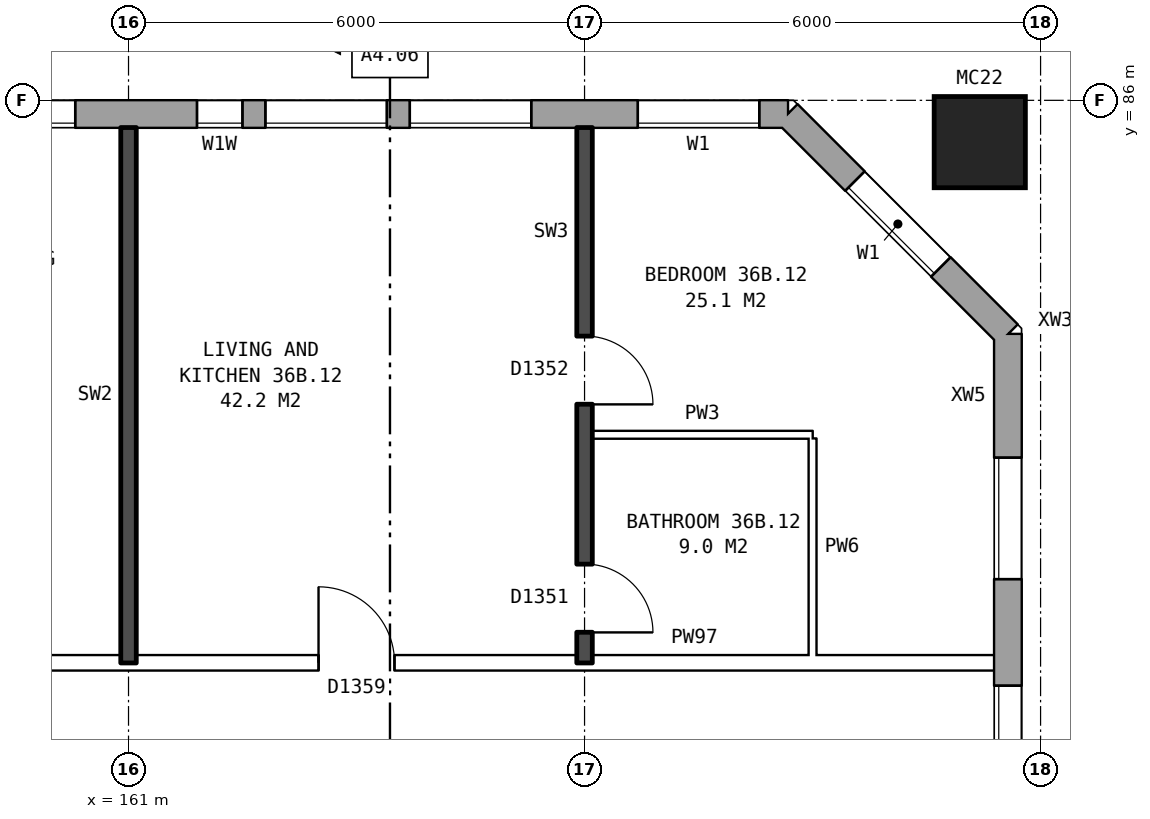
"""IFC4 building model, lengths in metres.
Left out: names, types, materials, properties, quantities, classifications, styles, units other than length and angle.
Written with IfcOpenShell. Run it as: python <this file> out.ifc"""

import sys

from ifc_helpers import new_model, si_unit, direction, frame, frame_2d, origin, origin_2d, place, context, subcontext, project, spatial, rectangle, hollow_rectangle, extrude, element, fill, save


model = new_model("IFC4")
c1 = context("Model", 3, precision=1e-05, world=origin(), true_north=direction((0.0, 1.0)))
c2 = subcontext(c1, "Body", "Model", "MODEL_VIEW")
j1 = project(units=[si_unit("LENGTHUNIT", "METRE"), si_unit("PLANEANGLEUNIT", "RADIAN")], contexts=[c1])
p1 = place(None, origin())
s1 = spatial("IfcSite", under=j1, at=p1, CompositionType="ELEMENT")
p2 = place(p1, origin())
s2 = spatial("IfcBuilding", under=s1, at=p2, CompositionType="ELEMENT")
p3 = place(p2, frame((0.0, 0.0, 129.9)))
s3 = spatial("IfcBuildingStorey", under=s2, at=p3, CompositionType="ELEMENT", Elevation=129.9)
p4 = place(p3, frame((172.2, 85.45, 0.0), z_axis=(0.0, 0.0, 1.0), x_axis=(1.0, 0.0, 0.0)))
e1 = element("IfcColumn", 1, at=p4, inside=s3, PredefinedType="COLUMN", context=c2, shape_type="SweptSolid", body=[
    extrude(hollow_rectangle(XDim=1.2, YDim=1.2, WallThickness=0.065, at=origin_2d()), origin(), (0.0, 0.0, 1.0), 3.1),
])
p5 = place(p3, frame((172.57, 57.075, 0.0), z_axis=(0.0, 0.0, 1.0), x_axis=(0.0, 1.0, 0.0)))
e2 = element("IfcWall", 2, at=p5, inside=s3, PredefinedType="STANDARD", context=c2, shape_type="SweptSolid", body=[
    extrude(rectangle(XDim=25.851, YDim=0.36, at=frame_2d((12.925, 0.0))), origin(), (0.0, 0.0, 1.0), 2.85),
])
p6 = place(p5, frame((1.625, 0.0, 0.8)))
e3 = element("IfcOpeningElement", 3, at=p6, cuts=e2, PredefinedType="OPENING", context=c2, shape_type="SweptSolid", body=[
    extrude(rectangle(XDim=1.6, YDim=1.8, at=frame_2d((0.8, 0.9))), frame((0.0, 0.19, 0.0), z_axis=(0.0, -1.0, 0.0), x_axis=(1.0, 0.0, 0.0)), (0.0, 0.0, 1.0), 0.38),
])
p7 = place(p5, frame((4.625, 0.0, 0.8)))
e4 = element("IfcOpeningElement", 4, at=p7, cuts=e2, PredefinedType="OPENING", context=c2, shape_type="SweptSolid", body=[
    extrude(rectangle(XDim=1.6, YDim=1.8, at=frame_2d((0.8, 0.9))), frame((0.0, 0.19, 0.0), z_axis=(0.0, -1.0, 0.0), x_axis=(1.0, 0.0, 0.0)), (0.0, 0.0, 1.0), 0.38),
])
p8 = place(p5, frame((7.625, 0.0, 0.8)))
e5 = element("IfcOpeningElement", 5, at=p8, cuts=e2, PredefinedType="OPENING", context=c2, shape_type="SweptSolid", body=[
    extrude(rectangle(XDim=1.6, YDim=1.8, at=frame_2d((0.8, 0.9))), frame((0.0, 0.19, 0.0), z_axis=(0.0, -1.0, 0.0), x_axis=(1.0, 0.0, 0.0)), (0.0, 0.0, 1.0), 0.38),
])
p9 = place(p5, frame((6.525, 0.0, 0.8)))
e6 = element("IfcOpeningElement", 6, at=p9, cuts=e2, PredefinedType="OPENING", context=c2, shape_type="SweptSolid", body=[
    extrude(rectangle(XDim=0.8, YDim=1.8, at=frame_2d((0.4, 0.9))), frame((0.0, 0.19, 0.0), z_axis=(0.0, -1.0, 0.0), x_axis=(1.0, 0.0, 0.0)), (0.0, 0.0, 1.0), 0.38),
])
p10 = place(p5, frame((9.525, 0.0, 0.8)))
e7 = element("IfcOpeningElement", 7, at=p10, cuts=e2, PredefinedType="OPENING", context=c2, shape_type="SweptSolid", body=[
    extrude(rectangle(XDim=1.4, YDim=1.2, at=frame_2d((0.7, 0.6))), frame((0.0, 0.19, 0.0), z_axis=(0.0, -1.0, 0.0), x_axis=(1.0, 0.0, 0.0)), (0.0, 0.0, 1.0), 0.38),
])
p11 = place(p5, frame((16.625, 0.0, 0.8)))
e8 = element("IfcOpeningElement", 8, at=p11, cuts=e2, PredefinedType="OPENING", context=c2, shape_type="SweptSolid", body=[
    extrude(rectangle(XDim=1.6, YDim=1.8, at=frame_2d((0.8, 0.9))), frame((0.0, 0.19, 0.0), z_axis=(0.0, -1.0, 0.0), x_axis=(1.0, 0.0, 0.0)), (0.0, 0.0, 1.0), 0.38),
])
p12 = place(p5, frame((19.625, 0.0, 0.8)))
e9 = element("IfcOpeningElement", 9, at=p12, cuts=e2, PredefinedType="OPENING", context=c2, shape_type="SweptSolid", body=[
    extrude(rectangle(XDim=1.6, YDim=1.8, at=frame_2d((0.8, 0.9))), frame((0.0, 0.19, 0.0), z_axis=(0.0, -1.0, 0.0), x_axis=(1.0, 0.0, 0.0)), (0.0, 0.0, 1.0), 0.38),
])
p13 = place(p5, frame((22.625, 0.0, 0.8)))
e10 = element("IfcOpeningElement", 10, at=p13, cuts=e2, PredefinedType="OPENING", context=c2, shape_type="SweptSolid", body=[
    extrude(rectangle(XDim=1.6, YDim=1.8, at=frame_2d((0.8, 0.9))), frame((0.0, 0.19, 0.0), z_axis=(0.0, -1.0, 0.0), x_axis=(1.0, 0.0, 0.0)), (0.0, 0.0, 1.0), 0.38),
])
p14 = place(p5, frame((12.275, 0.0, 0.8)))
e11 = element("IfcOpeningElement", 11, at=p14, cuts=e2, PredefinedType="OPENING", context=c2, shape_type="SweptSolid", body=[
    extrude(rectangle(XDim=1.2, YDim=1.8, at=frame_2d((0.6, 0.9))), frame((0.0, 0.19, 0.0), z_axis=(0.0, -1.0, 0.0), x_axis=(1.0, 0.0, 0.0)), (0.0, 0.0, 1.0), 0.38),
])
p15 = place(p5, frame((14.425, 0.0, 0.8)))
e12 = element("IfcOpeningElement", 12, at=p15, cuts=e2, PredefinedType="OPENING", context=c2, shape_type="SweptSolid", body=[
    extrude(rectangle(XDim=1.2, YDim=0.9, at=frame_2d((0.6, 0.45))), frame((0.0, 0.19, 0.0), z_axis=(0.0, -1.0, 0.0), x_axis=(1.0, 0.0, 0.0)), (0.0, 0.0, 1.0), 0.38),
])
p16 = place(p5, frame((18.525, 0.0, 0.8)))
e13 = element("IfcOpeningElement", 13, at=p16, cuts=e2, PredefinedType="OPENING", context=c2, shape_type="SweptSolid", body=[
    extrude(rectangle(XDim=0.6, YDim=1.8, at=frame_2d((0.3, 0.9))), frame((0.0, 0.19, 0.0), z_axis=(0.0, -1.0, 0.0), x_axis=(1.0, 0.0, 0.0)), (0.0, 0.0, 1.0), 0.38),
])
p17 = place(p3, frame((172.57, 82.925, 0.0), z_axis=(0.0, 0.0, 1.0), x_axis=(-0.707106781187, 0.707106781187, 0.0)))
e14 = element("IfcWall", 14, at=p17, inside=s3, PredefinedType="STANDARD", context=c2, shape_type="SweptSolid", body=[
    extrude(rectangle(XDim=4.094, YDim=0.36, at=frame_2d((2.047, 0.0))), origin(), (0.0, 0.0, 1.0), 2.85),
])
p18 = place(p17, frame((1.247, 0.0, 0.8)))
e15 = element("IfcOpeningElement", 15, at=p18, cuts=e14, PredefinedType="OPENING", context=c2, shape_type="SweptSolid", body=[
    extrude(rectangle(XDim=1.6, YDim=1.8, at=frame_2d((0.8, 0.9))), frame((0.0, 0.19, 0.0), z_axis=(0.0, -1.0, 0.0), x_axis=(1.0, 0.0, 0.0)), (0.0, 0.0, 1.0), 0.38),
])
p19 = place(p3, frame((169.675, 85.82, 0.0), z_axis=(0.0, 0.0, 1.0), x_axis=(-1.0, 0.0, 0.0)))
e16 = element("IfcWall", 16, at=p19, inside=s3, PredefinedType="STANDARD", context=c2, shape_type="SweptSolid", body=[
    extrude(rectangle(XDim=35.601, YDim=0.36, at=frame_2d((17.8, 0.0))), origin(), (0.0, 0.0, 1.0), 2.85),
])
p20 = place(p19, frame((0.375, 0.0, 0.8)))
e17 = element("IfcOpeningElement", 17, at=p20, cuts=e16, PredefinedType="OPENING", context=c2, shape_type="SweptSolid", body=[
    extrude(rectangle(XDim=1.6, YDim=1.8, at=frame_2d((0.8, 0.9))), frame((0.0, 0.19, 0.0), z_axis=(0.0, -1.0, 0.0), x_axis=(1.0, 0.0, 0.0)), (0.0, 0.0, 1.0), 0.38),
])
p21 = place(p19, frame((3.375, 0.0, 0.8)))
e18 = element("IfcOpeningElement", 18, at=p21, cuts=e16, PredefinedType="OPENING", context=c2, shape_type="SweptSolid", body=[
    extrude(rectangle(XDim=1.6, YDim=1.8, at=frame_2d((0.8, 0.9))), frame((0.0, 0.19, 0.0), z_axis=(0.0, -1.0, 0.0), x_axis=(1.0, 0.0, 0.0)), (0.0, 0.0, 1.0), 0.38),
])
p22 = place(p19, frame((5.275, 0.0, 0.8)))
e19 = element("IfcOpeningElement", 19, at=p22, cuts=e16, PredefinedType="OPENING", context=c2, shape_type="SweptSolid", body=[
    extrude(rectangle(XDim=1.6, YDim=1.8, at=frame_2d((0.8, 0.9))), frame((0.0, 0.19, 0.0), z_axis=(0.0, -1.0, 0.0), x_axis=(1.0, 0.0, 0.0)), (0.0, 0.0, 1.0), 0.38),
])
p23 = place(p19, frame((9.375, 0.0, 0.8)))
e20 = element("IfcOpeningElement", 20, at=p23, cuts=e16, PredefinedType="OPENING", context=c2, shape_type="SweptSolid", body=[
    extrude(rectangle(XDim=1.6, YDim=1.8, at=frame_2d((0.8, 0.9))), frame((0.0, 0.19, 0.0), z_axis=(0.0, -1.0, 0.0), x_axis=(1.0, 0.0, 0.0)), (0.0, 0.0, 1.0), 0.38),
])
p24 = place(p19, frame((12.375, 0.0, 0.8)))
e21 = element("IfcOpeningElement", 21, at=p24, cuts=e16, PredefinedType="OPENING", context=c2, shape_type="SweptSolid", body=[
    extrude(rectangle(XDim=1.6, YDim=1.8, at=frame_2d((0.8, 0.9))), frame((0.0, 0.19, 0.0), z_axis=(0.0, -1.0, 0.0), x_axis=(1.0, 0.0, 0.0)), (0.0, 0.0, 1.0), 0.38),
])
p25 = place(p19, frame((15.375, 0.0, 0.8)))
e22 = element("IfcOpeningElement", 22, at=p25, cuts=e16, PredefinedType="OPENING", context=c2, shape_type="SweptSolid", body=[
    extrude(rectangle(XDim=1.6, YDim=1.8, at=frame_2d((0.8, 0.9))), frame((0.0, 0.19, 0.0), z_axis=(0.0, -1.0, 0.0), x_axis=(1.0, 0.0, 0.0)), (0.0, 0.0, 1.0), 0.38),
])
p26 = place(p19, frame((18.375, 0.0, 0.8)))
e23 = element("IfcOpeningElement", 23, at=p26, cuts=e16, PredefinedType="OPENING", context=c2, shape_type="SweptSolid", body=[
    extrude(rectangle(XDim=1.6, YDim=1.8, at=frame_2d((0.8, 0.9))), frame((0.0, 0.19, 0.0), z_axis=(0.0, -1.0, 0.0), x_axis=(1.0, 0.0, 0.0)), (0.0, 0.0, 1.0), 0.38),
])
p27 = place(p19, frame((21.375, 0.0, 0.8)))
e24 = element("IfcOpeningElement", 24, at=p27, cuts=e16, PredefinedType="OPENING", context=c2, shape_type="SweptSolid", body=[
    extrude(rectangle(XDim=1.6, YDim=1.8, at=frame_2d((0.8, 0.9))), frame((0.0, 0.19, 0.0), z_axis=(0.0, -1.0, 0.0), x_axis=(1.0, 0.0, 0.0)), (0.0, 0.0, 1.0), 0.38),
])
p28 = place(p19, frame((24.375, 0.0, 0.8)))
e25 = element("IfcOpeningElement", 25, at=p28, cuts=e16, PredefinedType="OPENING", context=c2, shape_type="SweptSolid", body=[
    extrude(rectangle(XDim=1.6, YDim=1.8, at=frame_2d((0.8, 0.9))), frame((0.0, 0.19, 0.0), z_axis=(0.0, -1.0, 0.0), x_axis=(1.0, 0.0, 0.0)), (0.0, 0.0, 1.0), 0.38),
])
p29 = place(p19, frame((27.825, 0.0, 1.7)))
e26 = element("IfcOpeningElement", 26, at=p29, cuts=e16, PredefinedType="OPENING", context=c2, shape_type="SweptSolid", body=[
    extrude(rectangle(XDim=0.6, YDim=0.9, at=frame_2d((0.3, 0.45))), frame((0.0, 0.19, 0.0), z_axis=(0.0, -1.0, 0.0), x_axis=(1.0, 0.0, 0.0)), (0.0, 0.0, 1.0), 0.38),
])
p30 = place(p19, frame((30.375, 0.0, 0.8)))
e27 = element("IfcOpeningElement", 27, at=p30, cuts=e16, PredefinedType="OPENING", context=c2, shape_type="SweptSolid", body=[
    extrude(rectangle(XDim=1.6, YDim=1.8, at=frame_2d((0.8, 0.9))), frame((0.0, 0.19, 0.0), z_axis=(0.0, -1.0, 0.0), x_axis=(1.0, 0.0, 0.0)), (0.0, 0.0, 1.0), 0.38),
])
p31 = place(p19, frame((33.375, 0.0, 0.8)))
e28 = element("IfcOpeningElement", 28, at=p31, cuts=e16, PredefinedType="OPENING", context=c2, shape_type="SweptSolid", body=[
    extrude(rectangle(XDim=1.6, YDim=1.8, at=frame_2d((0.8, 0.9))), frame((0.0, 0.19, 0.0), z_axis=(0.0, -1.0, 0.0), x_axis=(1.0, 0.0, 0.0)), (0.0, 0.0, 1.0), 0.38),
])
p32 = place(p19, frame((7.175, 0.0, 1.7)))
e29 = element("IfcOpeningElement", 29, at=p32, cuts=e16, PredefinedType="OPENING", context=c2, shape_type="SweptSolid", body=[
    extrude(rectangle(XDim=0.6, YDim=0.9, at=frame_2d((0.3, 0.45))), frame((0.0, 0.19, 0.0), z_axis=(0.0, -1.0, 0.0), x_axis=(1.0, 0.0, 0.0)), (0.0, 0.0, 1.0), 0.38),
])
p33 = place(p19, frame((28.725, 0.0, 0.8)))
e30 = element("IfcOpeningElement", 30, at=p33, cuts=e16, PredefinedType="OPENING", context=c2, shape_type="SweptSolid", body=[
    extrude(rectangle(XDim=1.2, YDim=1.8, at=frame_2d((0.6, 0.9))), frame((0.0, 0.19, 0.0), z_axis=(0.0, -1.0, 0.0), x_axis=(1.0, 0.0, 0.0)), (0.0, 0.0, 1.0), 0.38),
])
p34 = place(p3, frame((155.1, 78.6, 0.0), z_axis=(0.0, 0.0, 1.0), x_axis=(1.0, 0.0, 0.0)))
e31 = element("IfcWall", 31, at=p34, inside=s3, PredefinedType="PARTITIONING", context=c2, shape_type="SweptSolid", body=[
    extrude(rectangle(XDim=17.29, YDim=0.2, at=frame_2d((8.645, 0.0))), origin(), (0.0, 0.0, 1.0), 2.85),
])
p35 = place(p34, frame((3.6, 0.0, 0.0)))
e32 = element("IfcOpeningElement", 32, at=p35, cuts=e31, PredefinedType="OPENING", context=c2, shape_type="SweptSolid", body=[
    extrude(rectangle(XDim=1.0, YDim=2.1, at=frame_2d((0.5, 1.05))), frame((0.0, 0.11, 0.0), z_axis=(0.0, -1.0, 0.0), x_axis=(1.0, 0.0, 0.0)), (0.0, 0.0, 1.0), 0.22),
])
p36 = place(p34, frame((8.4, 0.0, 0.0)))
e33 = element("IfcOpeningElement", 33, at=p36, cuts=e31, PredefinedType="OPENING", context=c2, shape_type="SweptSolid", body=[
    extrude(rectangle(XDim=1.0, YDim=2.1, at=frame_2d((0.5, 1.05))), frame((0.0, 0.11, 0.0), z_axis=(0.0, -1.0, 0.0), x_axis=(1.0, 0.0, 0.0)), (0.0, 0.0, 1.0), 0.22),
])
p37 = place(p3, frame((167.1, 81.6, 0.0), z_axis=(0.0, 0.0, 1.0), x_axis=(1.0, 0.0, 0.0)))
e34 = element("IfcWall", 34, at=p37, inside=s3, PredefinedType="PARTITIONING", context=c2, shape_type="SweptSolid", body=[
    extrude(rectangle(XDim=2.9, YDim=0.1, at=frame_2d((1.45, 0.0))), origin(), (0.0, 0.0, 1.0), 2.85),
])
p38 = place(p3, frame((161.0, 78.6, 0.0), z_axis=(0.0, 0.0, 1.0), x_axis=(0.0, 1.0, 0.0)))
e35 = element("IfcWall", 35, at=p38, inside=s3, PredefinedType="SOLIDWALL", context=c2, shape_type="SweptSolid", body=[
    extrude(rectangle(XDim=7.04, YDim=0.2, at=frame_2d((3.52, 0.0))), origin(), (0.0, 0.0, 1.0), 2.85),
])
p39 = place(p3, frame((167.0, 78.6, 0.0), z_axis=(0.0, 0.0, 1.0), x_axis=(0.0, 1.0, 0.0)))
e36 = element("IfcWall", 36, at=p39, inside=s3, PredefinedType="SOLIDWALL", context=c2, shape_type="SweptSolid", body=[
    extrude(rectangle(XDim=7.04, YDim=0.2, at=frame_2d((3.52, 0.0))), origin(), (0.0, 0.0, 1.0), 2.85),
])
p40 = place(p39, frame((3.4, 0.0, 0.0)))
e37 = element("IfcOpeningElement", 37, at=p40, cuts=e36, PredefinedType="OPENING", context=c2, shape_type="SweptSolid", body=[
    extrude(rectangle(XDim=0.9, YDim=2.1, at=frame_2d((0.45, 1.05))), frame((0.0, 0.11, 0.0), z_axis=(0.0, -1.0, 0.0), x_axis=(1.0, 0.0, 0.0)), (0.0, 0.0, 1.0), 0.22),
])
p41 = place(p39, frame((0.4, 0.0, 0.0)))
e38 = element("IfcOpeningElement", 38, at=p41, cuts=e36, PredefinedType="OPENING", context=c2, shape_type="SweptSolid", body=[
    extrude(rectangle(XDim=0.9, YDim=2.1, at=frame_2d((0.45, 1.05))), frame((0.0, 0.11, 0.0), z_axis=(0.0, -1.0, 0.0), x_axis=(1.0, 0.0, 0.0)), (0.0, 0.0, 1.0), 0.22),
])
p42 = place(p3, frame((170.0, 78.7, 0.0), z_axis=(0.0, 0.0, 1.0), x_axis=(0.0, 1.0, 0.0)))
e39 = element("IfcWall", 39, at=p42, inside=s3, PredefinedType="PARTITIONING", context=c2, shape_type="SweptSolid", body=[
    extrude(rectangle(XDim=2.85, YDim=0.1, at=frame_2d((1.425, 0.0))), origin(), (0.0, 0.0, 1.0), 2.85),
])
p43 = place(p12, origin())
e40 = element("IfcWindow", 40, at=p43, inside=s3, PartitioningType="SINGLE_PANEL", PredefinedType="WINDOW", context=c2, shape_type="SweptSolid", body=[
    extrude(rectangle(XDim=1.6, YDim=1.8, at=frame_2d((0.8, 0.9))), frame((0.0, 0.15, 0.0), z_axis=(0.0, -1.0, 0.0), x_axis=(1.0, 0.0, 0.0)), (0.0, 0.0, 1.0), 0.06),
])
fill(e9, e40)
p44 = place(p13, origin())
e41 = element("IfcWindow", 41, at=p44, inside=s3, PartitioningType="SINGLE_PANEL", PredefinedType="WINDOW", context=c2, shape_type="SweptSolid", body=[
    extrude(rectangle(XDim=1.6, YDim=1.8, at=frame_2d((0.8, 0.9))), frame((0.0, 0.15, 0.0), z_axis=(0.0, -1.0, 0.0), x_axis=(1.0, 0.0, 0.0)), (0.0, 0.0, 1.0), 0.06),
])
fill(e10, e41)
p45 = place(p18, origin())
e42 = element("IfcWindow", 42, at=p45, inside=s3, PartitioningType="SINGLE_PANEL", PredefinedType="WINDOW", context=c2, shape_type="SweptSolid", body=[
    extrude(rectangle(XDim=1.6, YDim=1.8, at=frame_2d((0.8, 0.9))), frame((0.0, 0.15, 0.0), z_axis=(0.0, -1.0, 0.0), x_axis=(1.0, 0.0, 0.0)), (0.0, 0.0, 1.0), 0.06),
])
fill(e15, e42)
p46 = place(p20, origin())
e43 = element("IfcWindow", 43, at=p46, inside=s3, PartitioningType="SINGLE_PANEL", PredefinedType="WINDOW", context=c2, shape_type="SweptSolid", body=[
    extrude(rectangle(XDim=1.6, YDim=1.8, at=frame_2d((0.8, 0.9))), frame((0.0, 0.15, 0.0), z_axis=(0.0, -1.0, 0.0), x_axis=(1.0, 0.0, 0.0)), (0.0, 0.0, 1.0), 0.06),
])
fill(e17, e43)
p47 = place(p21, origin())
e44 = element("IfcWindow", 44, at=p47, inside=s3, PartitioningType="SINGLE_PANEL", PredefinedType="WINDOW", context=c2, shape_type="SweptSolid", body=[
    extrude(rectangle(XDim=1.6, YDim=1.8, at=frame_2d((0.8, 0.9))), frame((0.0, 0.15, 0.0), z_axis=(0.0, -1.0, 0.0), x_axis=(1.0, 0.0, 0.0)), (0.0, 0.0, 1.0), 0.06),
])
fill(e18, e44)
p48 = place(p22, origin())
e45 = element("IfcWindow", 45, at=p48, inside=s3, PartitioningType="SINGLE_PANEL", PredefinedType="WINDOW", context=c2, shape_type="SweptSolid", body=[
    extrude(rectangle(XDim=1.6, YDim=1.8, at=frame_2d((0.8, 0.9))), frame((0.0, 0.15, 0.0), z_axis=(0.0, -1.0, 0.0), x_axis=(1.0, 0.0, 0.0)), (0.0, 0.0, 1.0), 0.06),
])
fill(e19, e45)
p49 = place(p23, origin())
e46 = element("IfcWindow", 46, at=p49, inside=s3, PartitioningType="SINGLE_PANEL", PredefinedType="WINDOW", context=c2, shape_type="SweptSolid", body=[
    extrude(rectangle(XDim=1.6, YDim=1.8, at=frame_2d((0.8, 0.9))), frame((0.0, 0.15, 0.0), z_axis=(0.0, -1.0, 0.0), x_axis=(1.0, 0.0, 0.0)), (0.0, 0.0, 1.0), 0.06),
])
fill(e20, e46)
p50 = place(p40, frame((0.9, 0.0, 0.0), z_axis=(0.0, 0.0, 1.0), x_axis=(-1.0, 0.0, 0.0)))
e47 = element("IfcDoor", 47, at=p50, inside=s3, OperationType="SINGLE_SWING_RIGHT", PredefinedType="DOOR", context=c2, shape_type="SweptSolid", body=[
    extrude(rectangle(XDim=0.9, YDim=2.1, at=frame_2d((0.45, 1.05))), frame((0.0, 0.025, 0.0), z_axis=(0.0, -1.0, 0.0), x_axis=(1.0, 0.0, 0.0)), (0.0, 0.0, 1.0), 0.05),
])
fill(e37, e47)
p51 = place(p36, origin())
e48 = element("IfcDoor", 48, at=p51, inside=s3, OperationType="SINGLE_SWING_LEFT", PredefinedType="DOOR", context=c2, shape_type="SweptSolid", body=[
    extrude(rectangle(XDim=1.0, YDim=2.1, at=frame_2d((0.5, 1.05))), frame((0.0, 0.025, 0.0), z_axis=(0.0, -1.0, 0.0), x_axis=(1.0, 0.0, 0.0)), (0.0, 0.0, 1.0), 0.05),
])
fill(e33, e48)
p52 = place(p41, frame((0.9, 0.0, 0.0), z_axis=(0.0, 0.0, 1.0), x_axis=(-1.0, 0.0, 0.0)))
e49 = element("IfcDoor", 49, at=p52, inside=s3, OperationType="SINGLE_SWING_RIGHT", PredefinedType="DOOR", context=c2, shape_type="SweptSolid", body=[
    extrude(rectangle(XDim=0.9, YDim=2.1, at=frame_2d((0.45, 1.05))), frame((0.0, 0.025, 0.0), z_axis=(0.0, -1.0, 0.0), x_axis=(1.0, 0.0, 0.0)), (0.0, 0.0, 1.0), 0.05),
])
fill(e38, e49)
p53 = place(p32, origin())
e50 = element("IfcWindow", 50, at=p53, inside=s3, PartitioningType="SINGLE_PANEL", PredefinedType="WINDOW", context=c2, shape_type="SweptSolid", body=[
    extrude(rectangle(XDim=0.6, YDim=0.9, at=frame_2d((0.3, 0.45))), frame((0.0, 0.15, 0.0), z_axis=(0.0, -1.0, 0.0), x_axis=(1.0, 0.0, 0.0)), (0.0, 0.0, 1.0), 0.06),
])
fill(e29, e50)
save(model, sys.argv[1])
